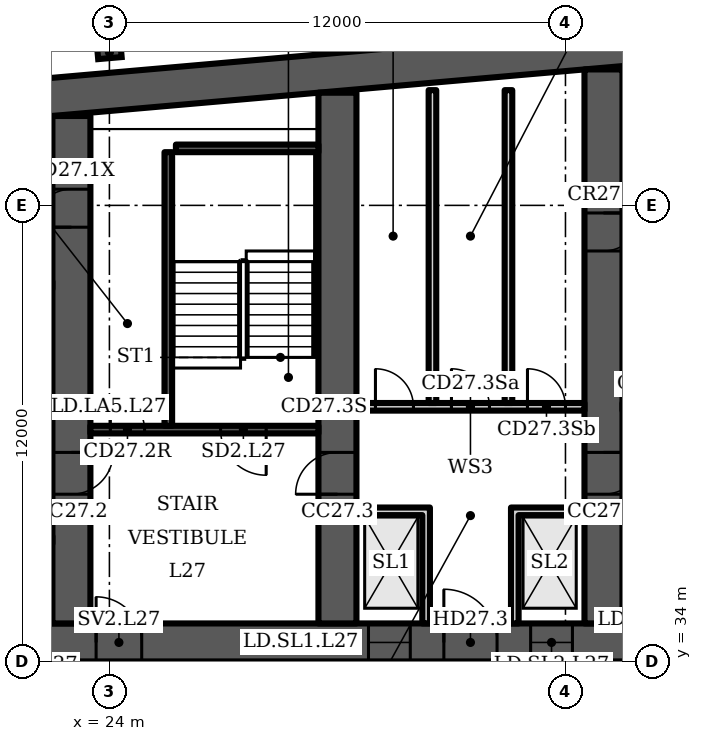
"""IFC4 building model, lengths in metres.
Left out: names, types, materials, properties, quantities, classifications, styles, units other than length and angle.
Written with IfcOpenShell. Run it as: python <this file> out.ifc"""

import sys

from ifc_helpers import new_model, si_unit, direction, frame, frame_2d, origin, origin_2d, place, context, subcontext, project, spatial, polyline, rectangle, i_section, outline, extrude, element, fill, save


model = new_model("IFC4")
c1 = context("Model", 3, precision=1e-05, world=origin(), true_north=direction((0.0, 1.0)))
c2 = subcontext(c1, "Body", "Model", "MODEL_VIEW")
j1 = project(units=[si_unit("LENGTHUNIT", "METRE"), si_unit("PLANEANGLEUNIT", "RADIAN")], contexts=[c1])
p1 = place(None, origin())
s1 = spatial("IfcSite", under=j1, at=p1, CompositionType="ELEMENT")
p2 = place(p1, origin())
s2 = spatial("IfcBuilding", under=s1, at=p2, CompositionType="ELEMENT")
p3 = place(p2, frame((0.0, 0.0, 118.3)))
s3 = spatial("IfcBuildingStorey", under=s2, at=p3, CompositionType="ELEMENT", Elevation=118.3)
p4 = place(p3, frame((0.0, 0.0, -0.0)))
e1 = element("IfcWall", 1, at=p4, inside=s3, PredefinedType="SHEAR", context=c2, shape_type="SweptSolid", body=[
    extrude(outline(polyline([(16.0, 47.784), (40.5, 49.927), (65.0, 47.784), (65.0, 48.787), (40.5, 50.931), (16.0, 48.787), (16.0, 47.784)])), origin(), (0.0, 0.0, 1.0), 3.6),
])
p5 = place(p3, frame((16.0, 34.5, 0.0), z_axis=(0.0, 0.0, 1.0), x_axis=(1.0, 0.0, 0.0)))
e2 = element("IfcWall", 2, at=p5, inside=s3, PredefinedType="SHEAR", context=c2, shape_type="SweptSolid", body=[
    extrude(rectangle(XDim=49.0, YDim=1.0, at=frame_2d((24.5, 0.0))), origin(), (0.0, 0.0, 1.0), 3.6),
])
p6 = place(p5, frame((1.2, 0.0, 0.0)))
e3 = element("IfcOpeningElement", 3, at=p6, cuts=e2, PredefinedType="OPENING", context=c2, shape_type="SweptSolid", body=[
    extrude(rectangle(XDim=1.1, YDim=2.1, at=frame_2d((0.55, 1.05))), frame((0.0, 0.51, 0.0), z_axis=(0.0, -1.0, 0.0), x_axis=(1.0, 0.0, 0.0)), (0.0, 0.0, 1.0), 1.02),
])
p7 = place(p5, frame((5.083, 0.0, 0.0)))
e4 = element("IfcOpeningElement", 4, at=p7, cuts=e2, PredefinedType="OPENING", context=c2, shape_type="SweptSolid", body=[
    extrude(rectangle(XDim=1.1, YDim=2.1, at=frame_2d((0.55, 1.05))), frame((0.0, 0.51, 0.0), z_axis=(0.0, -1.0, 0.0), x_axis=(1.0, 0.0, 0.0)), (0.0, 0.0, 1.0), 1.02),
])
p8 = place(p5, frame((2.933, 0.0, 0.0)))
e5 = element("IfcOpeningElement", 5, at=p8, cuts=e2, PredefinedType="OPENING", context=c2, shape_type="SweptSolid", body=[
    extrude(rectangle(XDim=1.4, YDim=2.1, at=frame_2d((0.7, 1.05))), frame((0.0, 0.51, 0.0), z_axis=(0.0, -1.0, 0.0), x_axis=(1.0, 0.0, 0.0)), (0.0, 0.0, 1.0), 1.02),
])
p9 = place(p5, frame((7.65, 0.0, 0.0)))
e6 = element("IfcOpeningElement", 6, at=p9, cuts=e2, PredefinedType="OPENING", context=c2, shape_type="SweptSolid", body=[
    extrude(rectangle(XDim=1.2, YDim=2.1, at=frame_2d((0.6, 1.05))), frame((0.0, 0.51, 0.0), z_axis=(0.0, -1.0, 0.0), x_axis=(1.0, 0.0, 0.0)), (0.0, 0.0, 1.0), 1.02),
])
p10 = place(p5, frame((14.817, 0.0, 0.0)))
e7 = element("IfcOpeningElement", 7, at=p10, cuts=e2, PredefinedType="OPENING", context=c2, shape_type="SweptSolid", body=[
    extrude(rectangle(XDim=1.1, YDim=2.1, at=frame_2d((0.55, 1.05))), frame((0.0, 0.51, 0.0), z_axis=(0.0, -1.0, 0.0), x_axis=(1.0, 0.0, 0.0)), (0.0, 0.0, 1.0), 1.02),
])
p11 = place(p5, frame((19.083, 0.0, 0.0)))
e8 = element("IfcOpeningElement", 8, at=p11, cuts=e2, PredefinedType="OPENING", context=c2, shape_type="SweptSolid", body=[
    extrude(rectangle(XDim=1.1, YDim=2.1, at=frame_2d((0.55, 1.05))), frame((0.0, 0.51, 0.0), z_axis=(0.0, -1.0, 0.0), x_axis=(1.0, 0.0, 0.0)), (0.0, 0.0, 1.0), 1.02),
])
p12 = place(p5, frame((16.8, 0.0, 0.0)))
e9 = element("IfcOpeningElement", 9, at=p12, cuts=e2, PredefinedType="OPENING", context=c2, shape_type="SweptSolid", body=[
    extrude(rectangle(XDim=1.4, YDim=2.1, at=frame_2d((0.7, 1.05))), frame((0.0, 0.51, 0.0), z_axis=(0.0, -1.0, 0.0), x_axis=(1.0, 0.0, 0.0)), (0.0, 0.0, 1.0), 1.02),
])
p13 = place(p5, frame((21.817, 0.0, 0.0)))
e10 = element("IfcOpeningElement", 10, at=p13, cuts=e2, PredefinedType="OPENING", context=c2, shape_type="SweptSolid", body=[
    extrude(rectangle(XDim=1.1, YDim=2.1, at=frame_2d((0.55, 1.05))), frame((0.0, 0.51, 0.0), z_axis=(0.0, -1.0, 0.0), x_axis=(1.0, 0.0, 0.0)), (0.0, 0.0, 1.0), 1.02),
])
p14 = place(p5, frame((26.083, 0.0, 0.0)))
e11 = element("IfcOpeningElement", 11, at=p14, cuts=e2, PredefinedType="OPENING", context=c2, shape_type="SweptSolid", body=[
    extrude(rectangle(XDim=1.1, YDim=2.1, at=frame_2d((0.55, 1.05))), frame((0.0, 0.51, 0.0), z_axis=(0.0, -1.0, 0.0), x_axis=(1.0, 0.0, 0.0)), (0.0, 0.0, 1.0), 1.02),
])
p15 = place(p5, frame((33.15, 0.0, 0.0)))
e12 = element("IfcOpeningElement", 12, at=p15, cuts=e2, PredefinedType="OPENING", context=c2, shape_type="SweptSolid", body=[
    extrude(rectangle(XDim=1.2, YDim=2.1, at=frame_2d((0.6, 1.05))), frame((0.0, 0.51, 0.0), z_axis=(0.0, -1.0, 0.0), x_axis=(1.0, 0.0, 0.0)), (0.0, 0.0, 1.0), 1.02),
])
p16 = place(p5, frame((37.8, 0.0, 0.0)))
e13 = element("IfcOpeningElement", 13, at=p16, cuts=e2, PredefinedType="OPENING", context=c2, shape_type="SweptSolid", body=[
    extrude(rectangle(XDim=1.4, YDim=2.1, at=frame_2d((0.7, 1.05))), frame((0.0, 0.51, 0.0), z_axis=(0.0, -1.0, 0.0), x_axis=(1.0, 0.0, 0.0)), (0.0, 0.0, 1.0), 1.02),
])
p17 = place(p5, frame((42.817, 0.0, 0.0)))
e14 = element("IfcOpeningElement", 14, at=p17, cuts=e2, PredefinedType="OPENING", context=c2, shape_type="SweptSolid", body=[
    extrude(rectangle(XDim=1.1, YDim=2.1, at=frame_2d((0.55, 1.05))), frame((0.0, 0.51, 0.0), z_axis=(0.0, -1.0, 0.0), x_axis=(1.0, 0.0, 0.0)), (0.0, 0.0, 1.0), 1.02),
])
p18 = place(p5, frame((46.7, 0.0, 0.0)))
e15 = element("IfcOpeningElement", 15, at=p18, cuts=e2, PredefinedType="OPENING", context=c2, shape_type="SweptSolid", body=[
    extrude(rectangle(XDim=1.1, YDim=2.1, at=frame_2d((0.55, 1.05))), frame((0.0, 0.51, 0.0), z_axis=(0.0, -1.0, 0.0), x_axis=(1.0, 0.0, 0.0)), (0.0, 0.0, 1.0), 1.02),
])
p19 = place(p5, frame((44.667, 0.0, 0.0)))
e16 = element("IfcOpeningElement", 16, at=p19, cuts=e2, PredefinedType="OPENING", context=c2, shape_type="SweptSolid", body=[
    extrude(rectangle(XDim=1.4, YDim=2.1, at=frame_2d((0.7, 1.05))), frame((0.0, 0.51, 0.0), z_axis=(0.0, -1.0, 0.0), x_axis=(1.0, 0.0, 0.0)), (0.0, 0.0, 1.0), 1.02),
])
p20 = place(p3, frame((23.0, 35.0, 0.0), z_axis=(0.0, 0.0, 1.0), x_axis=(0.0, 1.0, 0.0)))
e17 = element("IfcWall", 17, at=p20, inside=s3, PredefinedType="SHEAR", context=c2, shape_type="SweptSolid", body=[
    extrude(rectangle(XDim=13.352, YDim=1.0, at=frame_2d((6.676, 0.0))), origin(), (0.0, 0.0, 1.0), 3.6),
])
p21 = place(p20, frame((10.426, 0.0, 0.0)))
e18 = element("IfcOpeningElement", 18, at=p21, cuts=e17, PredefinedType="OPENING", context=c2, shape_type="SweptSolid", body=[
    extrude(rectangle(XDim=1.0, YDim=2.1, at=frame_2d((0.5, 1.05))), frame((0.0, 0.51, 0.0), z_axis=(0.0, -1.0, 0.0), x_axis=(1.0, 0.0, 0.0)), (0.0, 0.0, 1.0), 1.02),
])
p22 = place(p20, frame((3.4, 0.0, 0.0)))
e19 = element("IfcOpeningElement", 19, at=p22, cuts=e17, PredefinedType="OPENING", context=c2, shape_type="SweptSolid", body=[
    extrude(rectangle(XDim=1.1, YDim=2.1, at=frame_2d((0.55, 1.05))), frame((0.0, 0.51, 0.0), z_axis=(0.0, -1.0, 0.0), x_axis=(1.0, 0.0, 0.0)), (0.0, 0.0, 1.0), 1.02),
])
p23 = place(p3, frame((30.0, 35.0, 0.0), z_axis=(0.0, 0.0, 1.0), x_axis=(0.0, 1.0, 0.0)))
e20 = element("IfcWall", 20, at=p23, inside=s3, PredefinedType="SHEAR", context=c2, shape_type="SweptSolid", body=[
    extrude(rectangle(XDim=13.965, YDim=1.0, at=frame_2d((6.982, 0.0))), origin(), (0.0, 0.0, 1.0), 3.6),
])
p24 = place(p23, frame((3.4, 0.0, 0.0)))
e21 = element("IfcOpeningElement", 21, at=p24, cuts=e20, PredefinedType="OPENING", context=c2, shape_type="SweptSolid", body=[
    extrude(rectangle(XDim=1.1, YDim=2.1, at=frame_2d((0.55, 1.05))), frame((0.0, 0.51, 0.0), z_axis=(0.0, -1.0, 0.0), x_axis=(1.0, 0.0, 0.0)), (0.0, 0.0, 1.0), 1.02),
])
p25 = place(p3, frame((37.0, 35.0, 0.0), z_axis=(0.0, 0.0, 1.0), x_axis=(0.0, 1.0, 0.0)))
e22 = element("IfcWall", 22, at=p25, inside=s3, PredefinedType="SHEAR", context=c2, shape_type="SweptSolid", body=[
    extrude(rectangle(XDim=14.577, YDim=1.0, at=frame_2d((7.289, 0.0))), origin(), (0.0, 0.0, 1.0), 3.6),
])
p26 = place(p25, frame((3.4, 0.0, 0.0)))
e23 = element("IfcOpeningElement", 23, at=p26, cuts=e22, PredefinedType="OPENING", context=c2, shape_type="SweptSolid", body=[
    extrude(rectangle(XDim=1.1, YDim=2.1, at=frame_2d((0.55, 1.05))), frame((0.0, 0.51, 0.0), z_axis=(0.0, -1.0, 0.0), x_axis=(1.0, 0.0, 0.0)), (0.0, 0.0, 1.0), 1.02),
])
p27 = place(p25, frame((9.8, 0.0, 0.0)))
e24 = element("IfcOpeningElement", 24, at=p27, cuts=e22, PredefinedType="OPENING", context=c2, shape_type="SweptSolid", body=[
    extrude(rectangle(XDim=1.0, YDim=2.1, at=frame_2d((0.5, 1.05))), frame((0.0, 0.51, 0.0), z_axis=(0.0, -1.0, 0.0), x_axis=(1.0, 0.0, 0.0)), (0.0, 0.0, 1.0), 1.02),
])
p28 = place(p3, frame((24.0, 50.027, 0.0), z_axis=(0.0, 0.0, 1.0), x_axis=(-0.087156, 0.996198, 0.0)))
e25 = element("IfcColumn", 25, at=p28, inside=s3, PredefinedType="COLUMN", context=c2, shape_type="SweptSolid", body=[
    extrude(i_section(OverallWidth=0.305, OverallDepth=0.62, WebThickness=0.021, FlangeThickness=0.04, FilletRadius=0.027, at=origin_2d()), origin(), (0.0, 0.0, 1.0), 3.6),
])
p29 = place(p3, frame((23.5, 40.1, 0.0), z_axis=(0.0, 0.0, 1.0), x_axis=(1.0, 0.0, 0.0)))
e26 = element("IfcWall", 26, at=p29, inside=s3, PredefinedType="SHEAR", context=c2, shape_type="SweptSolid", body=[
    extrude(rectangle(XDim=6.0, YDim=0.2, at=frame_2d((3.0, 0.0))), origin(), (0.0, 0.0, 1.0), 3.2),
])
p30 = place(p29, frame((3.425, 0.0, 0.0)))
e27 = element("IfcOpeningElement", 27, at=p30, cuts=e26, PredefinedType="OPENING", context=c2, shape_type="SweptSolid", body=[
    extrude(rectangle(XDim=1.2, YDim=2.1, at=frame_2d((0.6, 1.05))), frame((0.0, 0.11, 0.0), z_axis=(0.0, -1.0, 0.0), x_axis=(1.0, 0.0, 0.0)), (0.0, 0.0, 1.0), 0.22),
])
p31 = place(p29, frame((0.525, 0.0, 0.0)))
e28 = element("IfcOpeningElement", 28, at=p31, cuts=e26, PredefinedType="OPENING", context=c2, shape_type="SweptSolid", body=[
    extrude(rectangle(XDim=0.9, YDim=2.1, at=frame_2d((0.45, 1.05))), frame((0.0, 0.11, 0.0), z_axis=(0.0, -1.0, 0.0), x_axis=(1.0, 0.0, 0.0)), (0.0, 0.0, 1.0), 0.22),
])
p32 = place(p3, frame((25.55, 40.2, 0.0), z_axis=(0.0, 0.0, 1.0), x_axis=(0.0, 1.0, 0.0)))
e29 = element("IfcWall", 29, at=p32, inside=s3, PredefinedType="SHEAR", context=c2, shape_type="SweptSolid", body=[
    extrude(rectangle(XDim=7.2, YDim=0.2, at=frame_2d((3.6, 0.0))), origin(), (0.0, 0.0, 1.0), 3.2),
])
p33 = place(p3, frame((25.75, 47.5, 0.0), z_axis=(0.0, 0.0, 1.0), x_axis=(1.0, 0.0, 0.0)))
e30 = element("IfcWall", 30, at=p33, inside=s3, PredefinedType="SHEAR", context=c2, shape_type="SweptSolid", body=[
    extrude(rectangle(XDim=3.75, YDim=0.2, at=frame_2d((1.875, 0.0))), origin(), (0.0, 0.0, 1.0), 3.2),
])
p34 = place(p3, frame((30.5, 40.7, 0.0), z_axis=(0.0, 0.0, 1.0), x_axis=(1.0, 0.0, 0.0)))
e31 = element("IfcWall", 31, at=p34, inside=s3, PredefinedType="PARTITIONING", context=c2, shape_type="SweptSolid", body=[
    extrude(rectangle(XDim=6.0, YDim=0.2, at=frame_2d((3.0, 0.0))), origin(), (0.0, 0.0, 1.0), 3.2),
])
p35 = place(p34, frame((0.5, 0.0, 0.0)))
e32 = element("IfcOpeningElement", 32, at=p35, cuts=e31, PredefinedType="OPENING", context=c2, shape_type="SweptSolid", body=[
    extrude(rectangle(XDim=1.0, YDim=2.1, at=frame_2d((0.5, 1.05))), frame((0.0, 0.11, 0.0), z_axis=(0.0, -1.0, 0.0), x_axis=(1.0, 0.0, 0.0)), (0.0, 0.0, 1.0), 0.22),
])
p36 = place(p34, frame((2.5, 0.0, 0.0)))
e33 = element("IfcOpeningElement", 33, at=p36, cuts=e31, PredefinedType="OPENING", context=c2, shape_type="SweptSolid", body=[
    extrude(rectangle(XDim=1.0, YDim=2.1, at=frame_2d((0.5, 1.05))), frame((0.0, 0.11, 0.0), z_axis=(0.0, -1.0, 0.0), x_axis=(1.0, 0.0, 0.0)), (0.0, 0.0, 1.0), 0.22),
])
p37 = place(p34, frame((4.5, 0.0, 0.0)))
e34 = element("IfcOpeningElement", 34, at=p37, cuts=e31, PredefinedType="OPENING", context=c2, shape_type="SweptSolid", body=[
    extrude(rectangle(XDim=1.0, YDim=2.1, at=frame_2d((0.5, 1.05))), frame((0.0, 0.11, 0.0), z_axis=(0.0, -1.0, 0.0), x_axis=(1.0, 0.0, 0.0)), (0.0, 0.0, 1.0), 0.22),
])
p38 = place(p3, frame((0.0, 0.0, -0.0)))
e35 = element("IfcWall", 35, at=p38, inside=s3, PredefinedType="PARTITIONING", context=c2, shape_type="SweptSolid", body=[
    extrude(outline(polyline([(32.233, 37.85), (30.5, 37.85), (30.5, 38.05), (32.233, 38.05), (32.433, 38.05), (32.433, 35.0), (32.233, 35.0), (32.233, 37.85)])), origin(), (0.0, 0.0, 1.0), 3.2),
])
p39 = place(p3, frame((0.0, 0.0, -0.0)))
e36 = element("IfcWall", 36, at=p39, inside=s3, PredefinedType="PARTITIONING", context=c2, shape_type="SweptSolid", body=[
    extrude(outline(polyline([(34.567, 38.05), (34.767, 38.05), (36.5, 38.05), (36.5, 37.85), (34.767, 37.85), (34.767, 35.0), (34.567, 35.0), (34.567, 38.05)])), origin(), (0.0, 0.0, 1.0), 3.2),
])
for number, where, z_axis, x_axis in (
    (37, (32.5, 40.8, 0.0), (0.0, 0.0, 1.0), (0.0, 1.0, 0.0)),
    (38, (34.5, 40.8, 0.0), (0.0, 0.0, 1.0), (0.0, 1.0, 0.0)),
):
    element("IfcWall", number, at=place(p3, frame(where, z_axis=z_axis, x_axis=x_axis)), inside=s3, PredefinedType="PARTITIONING", context=c2, shape_type="SweptSolid", body=[
        extrude(rectangle(XDim=8.232, YDim=0.2, at=frame_2d((4.116, 0.0))), origin(), (0.0, 0.0, 1.0), 3.2),
    ])
p40 = place(p21, origin())
e39 = element("IfcDoor", 39, at=p40, inside=s3, OperationType="SINGLE_SWING_LEFT", PredefinedType="DOOR", context=c2, shape_type="SweptSolid", body=[
    extrude(rectangle(XDim=1.0, YDim=2.1, at=frame_2d((0.5, 1.05))), frame((0.0, 0.5, 0.0), z_axis=(0.0, -1.0, 0.0), x_axis=(1.0, 0.0, 0.0)), (0.0, 0.0, 1.0), 1.0),
])
fill(e18, e39)
p41 = place(p30, origin())
e40 = element("IfcDoor", 40, at=p41, inside=s3, OperationType="SINGLE_SWING_RIGHT", PredefinedType="DOOR", context=c2, shape_type="SweptSolid", body=[
    extrude(rectangle(XDim=1.2, YDim=2.1, at=frame_2d((0.6, 1.05))), frame((0.0, 0.025, 0.0), z_axis=(0.0, -1.0, 0.0), x_axis=(1.0, 0.0, 0.0)), (0.0, 0.0, 1.0), 0.05),
])
fill(e27, e40)
p42 = place(p31, origin())
e41 = element("IfcDoor", 41, at=p42, inside=s3, OperationType="SINGLE_SWING_LEFT", PredefinedType="DOOR", context=c2, shape_type="SweptSolid", body=[
    extrude(rectangle(XDim=0.9, YDim=2.1, at=frame_2d((0.45, 1.05))), frame((0.0, 0.025, 0.0), z_axis=(0.0, -1.0, 0.0), x_axis=(1.0, 0.0, 0.0)), (0.0, 0.0, 1.0), 0.05),
])
fill(e28, e41)
p43 = place(p9, origin())
e42 = element("IfcDoor", 42, at=p43, inside=s3, OperationType="SINGLE_SWING_LEFT", PredefinedType="DOOR", context=c2, shape_type="SweptSolid", body=[
    extrude(rectangle(XDim=1.2, YDim=2.1, at=frame_2d((0.6, 1.05))), frame((0.0, 0.025, 0.0), z_axis=(0.0, -1.0, 0.0), x_axis=(1.0, 0.0, 0.0)), (0.0, 0.0, 1.0), 0.05),
])
fill(e6, e42)
p44 = place(p10, origin())
e43 = element("IfcDoor", 43, at=p44, inside=s3, OperationType="DOUBLE_DOOR_SLIDING", PredefinedType="DOOR", context=c2, shape_type="SweptSolid", body=[
    extrude(rectangle(XDim=1.1, YDim=2.1, at=frame_2d((0.55, 1.05))), frame((0.0, 0.025, 0.0), z_axis=(0.0, -1.0, 0.0), x_axis=(1.0, 0.0, 0.0)), (0.0, 0.0, 1.0), 0.05),
])
fill(e7, e43)
p45 = place(p11, origin())
e44 = element("IfcDoor", 44, at=p45, inside=s3, OperationType="DOUBLE_DOOR_SLIDING", PredefinedType="DOOR", context=c2, shape_type="SweptSolid", body=[
    extrude(rectangle(XDim=1.1, YDim=2.1, at=frame_2d((0.55, 1.05))), frame((0.0, 0.025, 0.0), z_axis=(0.0, -1.0, 0.0), x_axis=(1.0, 0.0, 0.0)), (0.0, 0.0, 1.0), 0.05),
])
fill(e8, e44)
p46 = place(p12, origin())
e45 = element("IfcDoor", 45, at=p46, inside=s3, OperationType="DOUBLE_DOOR_SINGLE_SWING", PredefinedType="DOOR", context=c2, shape_type="SweptSolid", body=[
    extrude(rectangle(XDim=1.4, YDim=2.1, at=frame_2d((0.7, 1.05))), frame((0.0, 0.025, 0.0), z_axis=(0.0, -1.0, 0.0), x_axis=(1.0, 0.0, 0.0)), (0.0, 0.0, 1.0), 0.05),
])
fill(e9, e45)
p47 = place(p35, origin())
e46 = element("IfcDoor", 46, at=p47, inside=s3, OperationType="SINGLE_SWING_LEFT", PredefinedType="DOOR", context=c2, shape_type="SweptSolid", body=[
    extrude(rectangle(XDim=1.0, YDim=2.1, at=frame_2d((0.5, 1.05))), frame((0.0, 0.025, 0.0), z_axis=(0.0, -1.0, 0.0), x_axis=(1.0, 0.0, 0.0)), (0.0, 0.0, 1.0), 0.05),
])
fill(e32, e46)
p48 = place(p36, origin())
e47 = element("IfcDoor", 47, at=p48, inside=s3, OperationType="SINGLE_SWING_LEFT", PredefinedType="DOOR", context=c2, shape_type="SweptSolid", body=[
    extrude(rectangle(XDim=1.0, YDim=2.1, at=frame_2d((0.5, 1.05))), frame((0.0, 0.025, 0.0), z_axis=(0.0, -1.0, 0.0), x_axis=(1.0, 0.0, 0.0)), (0.0, 0.0, 1.0), 0.05),
])
fill(e33, e47)
p49 = place(p37, origin())
e48 = element("IfcDoor", 48, at=p49, inside=s3, OperationType="SINGLE_SWING_LEFT", PredefinedType="DOOR", context=c2, shape_type="SweptSolid", body=[
    extrude(rectangle(XDim=1.0, YDim=2.1, at=frame_2d((0.5, 1.05))), frame((0.0, 0.025, 0.0), z_axis=(0.0, -1.0, 0.0), x_axis=(1.0, 0.0, 0.0)), (0.0, 0.0, 1.0), 0.05),
])
fill(e34, e48)
p50 = place(p22, origin())
e49 = element("IfcDoor", 49, at=p50, inside=s3, OperationType="SINGLE_SWING_RIGHT", PredefinedType="DOOR", context=c2, shape_type="SweptSolid", body=[
    extrude(rectangle(XDim=1.1, YDim=2.1, at=frame_2d((0.55, 1.05))), frame((0.0, 0.025, 0.0), z_axis=(0.0, -1.0, 0.0), x_axis=(1.0, 0.0, 0.0)), (0.0, 0.0, 1.0), 0.05),
])
fill(e19, e49)
p51 = place(p24, origin())
e50 = element("IfcDoor", 50, at=p51, inside=s3, OperationType="SINGLE_SWING_LEFT", PredefinedType="DOOR", context=c2, shape_type="SweptSolid", body=[
    extrude(rectangle(XDim=1.1, YDim=2.1, at=frame_2d((0.55, 1.05))), frame((0.0, 0.025, 0.0), z_axis=(0.0, -1.0, 0.0), x_axis=(1.0, 0.0, 0.0)), (0.0, 0.0, 1.0), 0.05),
])
fill(e21, e50)
p52 = place(p26, origin())
e51 = element("IfcDoor", 51, at=p52, inside=s3, OperationType="SINGLE_SWING_RIGHT", PredefinedType="DOOR", context=c2, shape_type="SweptSolid", body=[
    extrude(rectangle(XDim=1.1, YDim=2.1, at=frame_2d((0.55, 1.05))), frame((0.0, 0.025, 0.0), z_axis=(0.0, -1.0, 0.0), x_axis=(1.0, 0.0, 0.0)), (0.0, 0.0, 1.0), 0.05),
])
fill(e23, e51)
p53 = place(p27, origin())
e52 = element("IfcDoor", 52, at=p53, inside=s3, OperationType="SINGLE_SWING_RIGHT", PredefinedType="DOOR", context=c2, shape_type="SweptSolid", body=[
    extrude(rectangle(XDim=1.0, YDim=2.1, at=frame_2d((0.5, 1.05))), frame((0.0, 0.5, 0.0), z_axis=(0.0, -1.0, 0.0), x_axis=(1.0, 0.0, 0.0)), (0.0, 0.0, 1.0), 1.0),
])
fill(e24, e52)
save(model, sys.argv[1])
